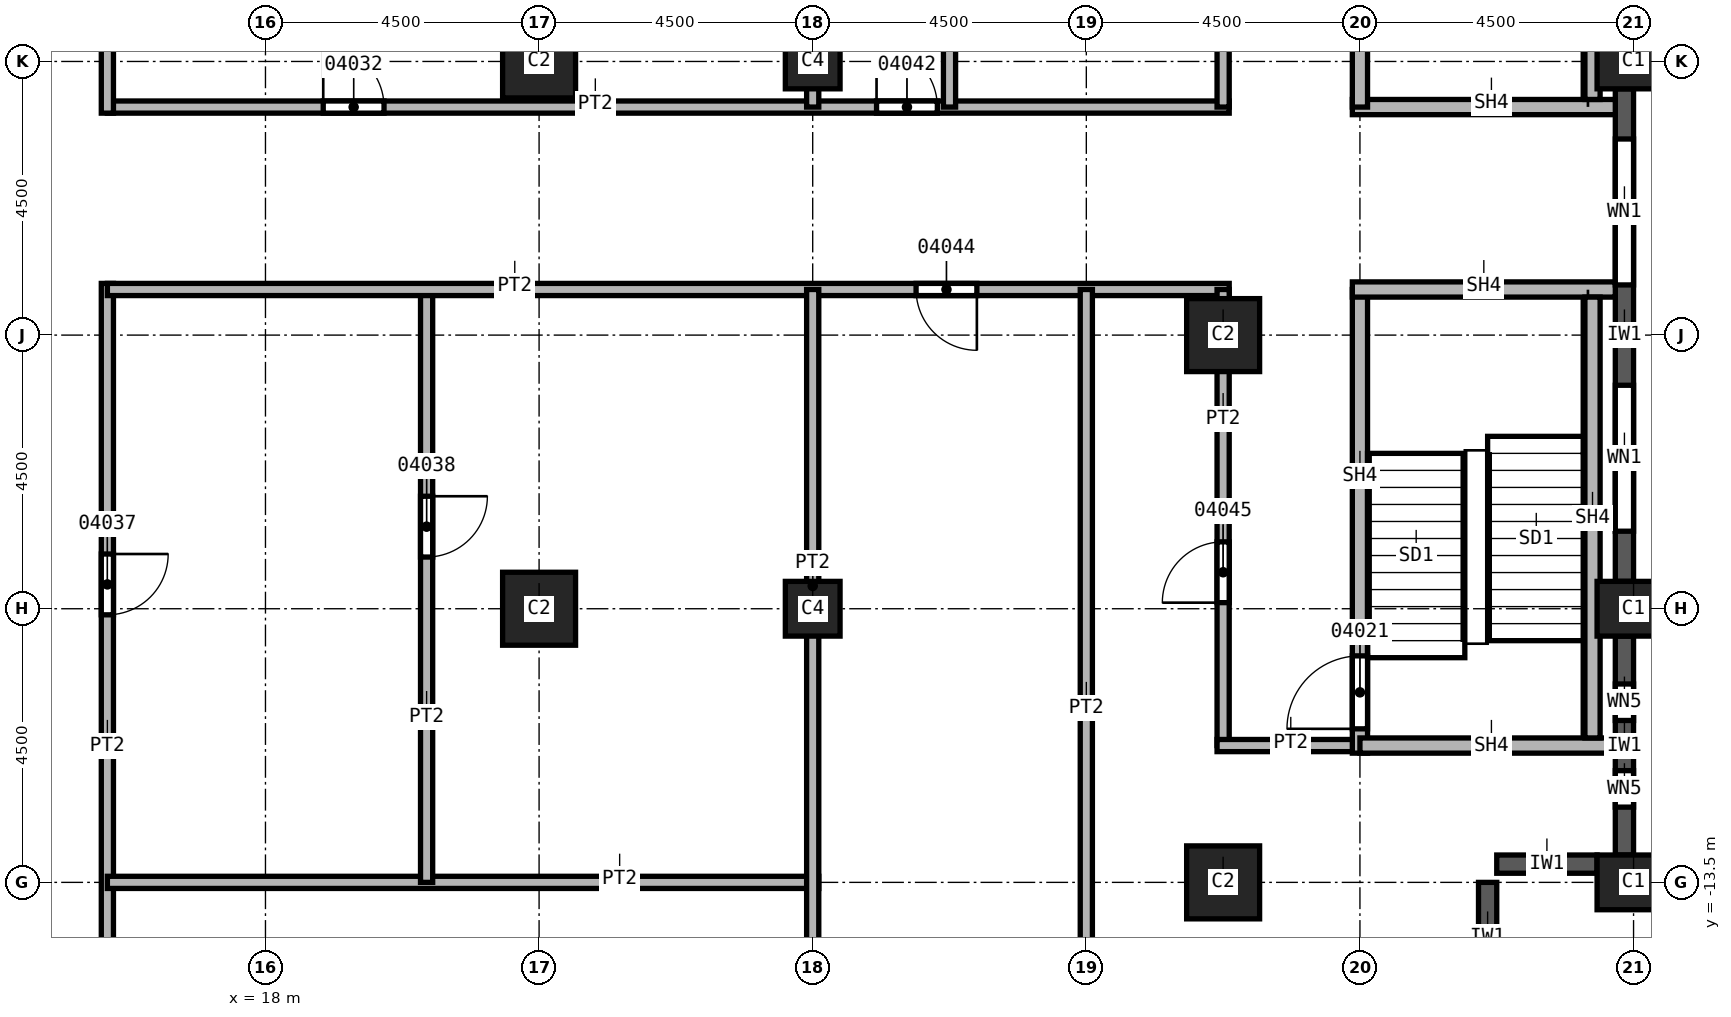
"""IFC4 building model, lengths in metres.
Left out: names, types, materials, properties, quantities, classifications, styles, units other than length and angle.
Written with IfcOpenShell. Run it as: python <this file> out.ifc"""

import sys

from ifc_helpers import new_model, si_unit, direction, frame, frame_2d, origin, origin_2d, place, context, subcontext, project, spatial, rectangle, extrude, element, fill, save


model = new_model("IFC4")
c1 = context("Model", 3, precision=1e-05, world=origin(), true_north=direction((0.0, 1.0)))
c2 = subcontext(c1, "Body", "Model", "MODEL_VIEW")
j1 = project(units=[si_unit("LENGTHUNIT", "METRE"), si_unit("PLANEANGLEUNIT", "RADIAN")], contexts=[c1])
p1 = place(None, origin())
s1 = spatial("IfcSite", under=j1, at=p1, CompositionType="ELEMENT")
p2 = place(p1, origin())
s2 = spatial("IfcBuilding", under=s1, at=p2, CompositionType="ELEMENT")
p3 = place(p2, frame((0.0, 0.0, 108.0)))
s3 = spatial("IfcBuildingStorey", under=s2, at=p3, CompositionType="ELEMENT", Elevation=108.0)
for number, where, z_axis, x_axis in (
    (1, (40.5, 0.0, 0.0), (0.0, 0.0, 1.0), (0.0, 1.0, 0.0)),
    (2, (40.5, -9.0, 0.0), (0.0, 0.0, 1.0), (0.0, 1.0, 0.0)),
    (3, (40.5, -13.5, 0.0), (0.0, 0.0, 1.0), (0.0, 1.0, 0.0)),
):
    element("IfcColumn", number, at=place(p3, frame(where, z_axis=z_axis, x_axis=x_axis)), inside=s3, PredefinedType="COLUMN", context=c2, shape_type="SweptSolid", body=[
        extrude(rectangle(XDim=0.9, YDim=1.2, at=origin_2d()), origin(), (0.0, 0.0, 1.0), 3.7),
    ])
for number, where, z_axis, x_axis in (
    (4, (33.75, -4.5, 0.0), (0.0, 0.0, 1.0), (1.0, 0.0, 0.0)),
    (5, (33.75, -13.5, 0.0), (0.0, 0.0, 1.0), (1.0, 0.0, 0.0)),
    (6, (22.5, 0.0, 0.0), (0.0, 0.0, 1.0), (1.0, 0.0, 0.0)),
    (7, (22.5, -9.0, 0.0), (0.0, 0.0, 1.0), (1.0, 0.0, 0.0)),
):
    element("IfcColumn", number, at=place(p3, frame(where, z_axis=z_axis, x_axis=x_axis)), inside=s3, PredefinedType="COLUMN", context=c2, shape_type="SweptSolid", body=[
        extrude(rectangle(XDim=1.2, YDim=1.2, at=origin_2d()), origin(), (0.0, 0.0, 1.0), 3.7),
    ])
for number, where, z_axis, x_axis in (
    (8, (27.0, 0.0, 0.0), (0.0, 0.0, 1.0), (1.0, 0.0, 0.0)),
    (9, (27.0, -9.0, 0.0), (0.0, 0.0, 1.0), (1.0, 0.0, 0.0)),
):
    element("IfcColumn", number, at=place(p3, frame(where, z_axis=z_axis, x_axis=x_axis)), inside=s3, PredefinedType="COLUMN", context=c2, shape_type="SweptSolid", body=[
        extrude(rectangle(XDim=0.9, YDim=0.9, at=origin_2d()), origin(), (0.0, 0.0, 1.0), 3.7),
    ])
p4 = place(p3, frame((38.1, -15.3, 0.0), z_axis=(0.0, 0.0, 1.0), x_axis=(0.0, 1.0, 0.0)))
e10 = element("IfcWall", 10, at=p4, inside=s3, PredefinedType="SOLIDWALL", context=c2, shape_type="SweptSolid", body=[
    extrude(rectangle(XDim=1.8, YDim=0.3, at=frame_2d((0.9, 0.0))), origin(), (0.0, 0.0, 1.0), 3.1),
])
p5 = place(p3, frame((39.9, -13.2, 0.0), z_axis=(0.0, 0.0, 1.0), x_axis=(-1.0, 0.0, 0.0)))
e11 = element("IfcWall", 11, at=p5, inside=s3, PredefinedType="SOLIDWALL", context=c2, shape_type="SweptSolid", body=[
    extrude(rectangle(XDim=1.65, YDim=0.3, at=frame_2d((0.825, 0.0))), origin(), (0.0, 0.0, 1.0), 3.1),
])
p6 = place(p3, frame((40.35, -13.05, 0.0), z_axis=(0.0, 0.0, 1.0), x_axis=(0.0, 1.0, 0.0)))
e12 = element("IfcWall", 12, at=p6, inside=s3, PredefinedType="SOLIDWALL", context=c2, shape_type="SweptSolid", body=[
    extrude(rectangle(XDim=3.6, YDim=0.3, at=frame_2d((1.8, 0.0))), origin(), (0.0, 0.0, 1.0), 3.1),
])
p7 = place(p6, frame((0.788, 0.0, 0.8)))
e13 = element("IfcOpeningElement", 13, at=p7, cuts=e12, PredefinedType="OPENING", context=c2, shape_type="SweptSolid", body=[
    extrude(rectangle(XDim=0.6, YDim=1.95, at=frame_2d((0.3, 0.975))), frame((0.0, 0.15, 0.0), z_axis=(0.0, -1.0, 0.0), x_axis=(1.0, 0.0, 0.0)), (0.0, 0.0, 1.0), 0.3),
])
p8 = place(p6, frame((2.212, 0.0, 0.8)))
e14 = element("IfcOpeningElement", 14, at=p8, cuts=e12, PredefinedType="OPENING", context=c2, shape_type="SweptSolid", body=[
    extrude(rectangle(XDim=0.6, YDim=1.95, at=frame_2d((0.3, 0.975))), frame((0.0, 0.15, 0.0), z_axis=(0.0, -1.0, 0.0), x_axis=(1.0, 0.0, 0.0)), (0.0, 0.0, 1.0), 0.3),
])
p9 = place(p3, frame((40.35, -8.55, 0.0), z_axis=(0.0, 0.0, 1.0), x_axis=(0.0, 1.0, 0.0)))
e15 = element("IfcWall", 15, at=p9, inside=s3, PredefinedType="SOLIDWALL", context=c2, shape_type="SweptSolid", body=[
    extrude(rectangle(XDim=8.1, YDim=0.3, at=frame_2d((4.05, 0.0))), origin(), (0.0, 0.0, 1.0), 3.1),
])
p10 = place(p9, frame((0.825, 0.0, 0.8)))
e16 = element("IfcOpeningElement", 16, at=p10, cuts=e15, PredefinedType="OPENING", context=c2, shape_type="SweptSolid", body=[
    extrude(rectangle(XDim=2.4, YDim=1.95, at=frame_2d((1.2, 0.975))), frame((0.0, 0.15, 0.0), z_axis=(0.0, -1.0, 0.0), x_axis=(1.0, 0.0, 0.0)), (0.0, 0.0, 1.0), 0.3),
])
p11 = place(p9, frame((4.875, 0.0, 0.8)))
e17 = element("IfcOpeningElement", 17, at=p11, cuts=e15, PredefinedType="OPENING", context=c2, shape_type="SweptSolid", body=[
    extrude(rectangle(XDim=2.4, YDim=1.95, at=frame_2d((1.2, 0.975))), frame((0.0, 0.15, 0.0), z_axis=(0.0, -1.0, 0.0), x_axis=(1.0, 0.0, 0.0)), (0.0, 0.0, 1.0), 0.3),
])
p12 = place(p3, frame((15.4, -3.65, 0.0), z_axis=(0.0, 0.0, 1.0), x_axis=(0.0, -1.0, 0.0)))
e18 = element("IfcWall", 18, at=p12, inside=s3, PredefinedType="PARTITIONING", context=c2, shape_type="SweptSolid", body=[
    extrude(rectangle(XDim=20.85, YDim=0.2, at=frame_2d((10.425, 0.0))), origin(), (0.0, 0.0, 1.0), 3.7),
])
p13 = place(p12, frame((18.85, 0.0, 0.0)))
e19 = element("IfcOpeningElement", 19, at=p13, cuts=e18, PredefinedType="OPENING", context=c2, shape_type="SweptSolid", body=[
    extrude(rectangle(XDim=1.0, YDim=2.1, at=frame_2d((0.5, 1.05))), frame((0.0, 0.1, 0.0), z_axis=(0.0, -1.0, 0.0), x_axis=(1.0, 0.0, 0.0)), (0.0, 0.0, 1.0), 0.2),
])
p14 = place(p12, frame((12.55, 0.0, 0.0)))
e20 = element("IfcOpeningElement", 20, at=p14, cuts=e18, PredefinedType="OPENING", context=c2, shape_type="SweptSolid", body=[
    extrude(rectangle(XDim=1.0, YDim=2.1, at=frame_2d((0.5, 1.05))), frame((0.0, 0.1, 0.0), z_axis=(0.0, -1.0, 0.0), x_axis=(1.0, 0.0, 0.0)), (0.0, 0.0, 1.0), 0.2),
])
p15 = place(p12, frame((4.45, 0.0, 0.0)))
e21 = element("IfcOpeningElement", 21, at=p15, cuts=e18, PredefinedType="OPENING", context=c2, shape_type="SweptSolid", body=[
    extrude(rectangle(XDim=1.0, YDim=2.1, at=frame_2d((0.5, 1.05))), frame((0.0, 0.1, 0.0), z_axis=(0.0, -1.0, 0.0), x_axis=(1.0, 0.0, 0.0)), (0.0, 0.0, 1.0), 0.2),
])
p16 = place(p3, frame((15.4, -13.5, 0.0), z_axis=(0.0, 0.0, 1.0), x_axis=(1.0, 0.0, 0.0)))
e22 = element("IfcWall", 22, at=p16, inside=s3, PredefinedType="PARTITIONING", context=c2, shape_type="SweptSolid", body=[
    extrude(rectangle(XDim=11.7, YDim=0.2, at=frame_2d((5.85, 0.0))), origin(), (0.0, 0.0, 1.0), 3.7),
])
p17 = place(p3, frame((15.4, -0.75, 0.0), z_axis=(0.0, 0.0, 1.0), x_axis=(1.0, 0.0, 0.0)))
e23 = element("IfcWall", 23, at=p17, inside=s3, PredefinedType="PARTITIONING", context=c2, shape_type="SweptSolid", body=[
    extrude(rectangle(XDim=18.45, YDim=0.2, at=frame_2d((9.225, 0.0))), origin(), (0.0, 0.0, 1.0), 3.7),
])
p18 = place(p17, frame((3.55, 0.0, 0.0)))
e24 = element("IfcOpeningElement", 24, at=p18, cuts=e23, PredefinedType="OPENING", context=c2, shape_type="SweptSolid", body=[
    extrude(rectangle(XDim=1.0, YDim=2.1, at=frame_2d((0.5, 1.05))), frame((0.0, 0.1, 0.0), z_axis=(0.0, -1.0, 0.0), x_axis=(1.0, 0.0, 0.0)), (0.0, 0.0, 1.0), 0.2),
])
p19 = place(p17, frame((12.65, 0.0, 0.0)))
e25 = element("IfcOpeningElement", 25, at=p19, cuts=e23, PredefinedType="OPENING", context=c2, shape_type="SweptSolid", body=[
    extrude(rectangle(XDim=1.0, YDim=2.1, at=frame_2d((0.5, 1.05))), frame((0.0, 0.1, 0.0), z_axis=(0.0, -1.0, 0.0), x_axis=(1.0, 0.0, 0.0)), (0.0, 0.0, 1.0), 0.2),
])
p20 = place(p3, frame((15.4, 24.5, 0.0), z_axis=(0.0, 0.0, 1.0), x_axis=(0.0, -1.0, 0.0)))
e26 = element("IfcWall", 26, at=p20, inside=s3, PredefinedType="PARTITIONING", context=c2, shape_type="SweptSolid", body=[
    extrude(rectangle(XDim=25.35, YDim=0.2, at=frame_2d((12.675, 0.0))), origin(), (0.0, 0.0, 1.0), 3.7),
])
p21 = place(p20, frame((4.6, 0.0, 0.0)))
e27 = element("IfcOpeningElement", 27, at=p21, cuts=e26, PredefinedType="OPENING", context=c2, shape_type="SweptSolid", body=[
    extrude(rectangle(XDim=1.0, YDim=2.1, at=frame_2d((0.5, 1.05))), frame((0.0, 0.1, 0.0), z_axis=(0.0, -1.0, 0.0), x_axis=(1.0, 0.0, 0.0)), (0.0, 0.0, 1.0), 0.2),
])
p22 = place(p3, frame((20.65, -3.75, 0.0), z_axis=(0.0, 0.0, 1.0), x_axis=(0.0, -1.0, 0.0)))
e28 = element("IfcWall", 28, at=p22, inside=s3, PredefinedType="PARTITIONING", context=c2, shape_type="SweptSolid", body=[
    extrude(rectangle(XDim=9.75, YDim=0.2, at=frame_2d((4.875, 0.0))), origin(), (0.0, 0.0, 1.0), 3.7),
])
p23 = place(p22, frame((3.4, 0.0, 0.0)))
e29 = element("IfcOpeningElement", 29, at=p23, cuts=e28, PredefinedType="OPENING", context=c2, shape_type="SweptSolid", body=[
    extrude(rectangle(XDim=1.0, YDim=2.1, at=frame_2d((0.5, 1.05))), frame((0.0, 0.1, 0.0), z_axis=(0.0, -1.0, 0.0), x_axis=(1.0, 0.0, 0.0)), (0.0, 0.0, 1.0), 0.2),
])
p24 = place(p3, frame((33.85, -3.75, 0.0), z_axis=(0.0, 0.0, 1.0), x_axis=(-1.0, 0.0, 0.0)))
e30 = element("IfcWall", 30, at=p24, inside=s3, PredefinedType="PARTITIONING", context=c2, shape_type="SweptSolid", body=[
    extrude(rectangle(XDim=18.45, YDim=0.2, at=frame_2d((9.225, 0.0))), origin(), (0.0, 0.0, 1.0), 3.7),
])
p25 = place(p24, frame((4.15, 0.0, 0.0)))
e31 = element("IfcOpeningElement", 31, at=p25, cuts=e30, PredefinedType="OPENING", context=c2, shape_type="SweptSolid", body=[
    extrude(rectangle(XDim=1.0, YDim=2.1, at=frame_2d((0.5, 1.05))), frame((0.0, 0.1, 0.0), z_axis=(0.0, -1.0, 0.0), x_axis=(1.0, 0.0, 0.0)), (0.0, 0.0, 1.0), 0.2),
])
p26 = place(p3, frame((27.0, -3.75, 0.0), z_axis=(0.0, 0.0, 1.0), x_axis=(0.0, -1.0, 0.0)))
e32 = element("IfcWall", 32, at=p26, inside=s3, PredefinedType="PARTITIONING", context=c2, shape_type="SweptSolid", body=[
    extrude(rectangle(XDim=13.65, YDim=0.2, at=frame_2d((6.825, 0.0))), origin(), (0.0, 0.0, 1.0), 3.7),
])
p27 = place(p3, frame((27.0, 17.4, 0.0), z_axis=(0.0, 0.0, 1.0), x_axis=(0.0, -1.0, 0.0)))
e33 = element("IfcWall", 33, at=p27, inside=s3, PredefinedType="PARTITIONING", context=c2, shape_type="SweptSolid", body=[
    extrude(rectangle(XDim=18.15, YDim=0.2, at=frame_2d((9.075, 0.0))), origin(), (0.0, 0.0, 1.0), 3.7),
])
p28 = place(p3, frame((29.25, 17.7, 0.0), z_axis=(0.0, 0.0, 1.0), x_axis=(0.0, -1.0, 0.0)))
e34 = element("IfcWall", 34, at=p28, inside=s3, PredefinedType="PARTITIONING", context=c2, shape_type="SweptSolid", body=[
    extrude(rectangle(XDim=18.45, YDim=0.2, at=frame_2d((9.225, 0.0))), origin(), (0.0, 0.0, 1.0), 3.7),
])
p29 = place(p3, frame((31.5, -3.75, 0.0), z_axis=(0.0, 0.0, 1.0), x_axis=(0.0, -1.0, 0.0)))
e35 = element("IfcWall", 35, at=p29, inside=s3, PredefinedType="PARTITIONING", context=c2, shape_type="SweptSolid", body=[
    extrude(rectangle(XDim=13.65, YDim=0.2, at=frame_2d((6.825, 0.0))), origin(), (0.0, 0.0, 1.0), 3.7),
])
p30 = place(p3, frame((33.75, -11.25, 0.0), z_axis=(0.0, 0.0, 1.0), x_axis=(0.0, 1.0, 0.0)))
e36 = element("IfcWall", 36, at=p30, inside=s3, PredefinedType="PARTITIONING", context=c2, shape_type="SweptSolid", body=[
    extrude(rectangle(XDim=7.5, YDim=0.2, at=frame_2d((3.75, 0.0))), origin(), (0.0, 0.0, 1.0), 3.7),
])
p31 = place(p30, frame((2.35, 0.0, 0.0)))
e37 = element("IfcOpeningElement", 37, at=p31, cuts=e36, PredefinedType="OPENING", context=c2, shape_type="SweptSolid", body=[
    extrude(rectangle(XDim=1.0, YDim=2.1, at=frame_2d((0.5, 1.05))), frame((0.0, 0.1, 0.0), z_axis=(0.0, -1.0, 0.0), x_axis=(1.0, 0.0, 0.0)), (0.0, 0.0, 1.0), 0.2),
])
p32 = place(p3, frame((33.75, -0.75, 0.0), z_axis=(0.0, 0.0, 1.0), x_axis=(0.0, 1.0, 0.0)))
e38 = element("IfcWall", 38, at=p32, inside=s3, PredefinedType="PARTITIONING", context=c2, shape_type="SweptSolid", body=[
    extrude(rectangle(XDim=7.5, YDim=0.2, at=frame_2d((3.75, 0.0))), origin(), (0.0, 0.0, 1.0), 3.7),
])
p33 = place(p32, frame((3.4, 0.0, 0.0)))
e39 = element("IfcOpeningElement", 39, at=p33, cuts=e38, PredefinedType="OPENING", context=c2, shape_type="SweptSolid", body=[
    extrude(rectangle(XDim=1.0, YDim=2.1, at=frame_2d((0.5, 1.05))), frame((0.0, 0.1, 0.0), z_axis=(0.0, -1.0, 0.0), x_axis=(1.0, 0.0, 0.0)), (0.0, 0.0, 1.0), 0.2),
])
p34 = place(p3, frame((36.0, -11.25, 0.0), z_axis=(0.0, 0.0, 1.0), x_axis=(-1.0, 0.0, 0.0)))
e40 = element("IfcWall", 40, at=p34, inside=s3, PredefinedType="PARTITIONING", context=c2, shape_type="SweptSolid", body=[
    extrude(rectangle(XDim=2.35, YDim=0.2, at=frame_2d((1.175, 0.0))), origin(), (0.0, 0.0, 1.0), 3.7),
])
p35 = place(p3, frame((35.875, -0.75, 0.0), z_axis=(0.0, 0.0, 1.0), x_axis=(1.0, 0.0, 0.0)))
e41 = element("IfcWall", 41, at=p35, inside=s3, PredefinedType="SOLIDWALL", context=c2, shape_type="SweptSolid", body=[
    extrude(rectangle(XDim=4.325, YDim=0.25, at=frame_2d((2.163, 0.0))), origin(), (0.0, 0.0, 1.0), 3.7),
])
p36 = place(p3, frame((36.0, -11.375, 0.0), z_axis=(0.0, 0.0, 1.0), x_axis=(0.0, 1.0, 0.0)))
e42 = element("IfcWall", 42, at=p36, inside=s3, PredefinedType="SOLIDWALL", context=c2, shape_type="SweptSolid", body=[
    extrude(rectangle(XDim=7.625, YDim=0.25, at=frame_2d((3.812, 0.0))), origin(), (0.0, 0.0, 1.0), 3.7),
])
p37 = place(p36, frame((0.4, 0.0, 0.0)))
e43 = element("IfcOpeningElement", 43, at=p37, cuts=e42, PredefinedType="OPENING", context=c2, shape_type="SweptSolid", body=[
    extrude(rectangle(XDim=1.2, YDim=2.1, at=frame_2d((0.6, 1.05))), frame((0.0, 0.125, 0.0), z_axis=(0.0, -1.0, 0.0), x_axis=(1.0, 0.0, 0.0)), (0.0, 0.0, 1.0), 0.25),
])
p38 = place(p3, frame((36.0, -0.75, 0.0), z_axis=(0.0, 0.0, 1.0), x_axis=(0.0, 1.0, 0.0)))
e44 = element("IfcWall", 44, at=p38, inside=s3, PredefinedType="SOLIDWALL", context=c2, shape_type="SweptSolid", body=[
    extrude(rectangle(XDim=7.625, YDim=0.25, at=frame_2d((3.812, 0.0))), origin(), (0.0, 0.0, 1.0), 3.7),
])
p39 = place(p38, frame((5.95, 0.0, 0.0)))
e45 = element("IfcOpeningElement", 45, at=p39, cuts=e44, PredefinedType="OPENING", context=c2, shape_type="SweptSolid", body=[
    extrude(rectangle(XDim=1.2, YDim=2.1, at=frame_2d((0.6, 1.05))), frame((0.0, 0.125, 0.0), z_axis=(0.0, -1.0, 0.0), x_axis=(1.0, 0.0, 0.0)), (0.0, 0.0, 1.0), 0.25),
])
p40 = place(p3, frame((40.2, -11.25, 0.0), z_axis=(0.0, 0.0, 1.0), x_axis=(-1.0, 0.0, 0.0)))
e46 = element("IfcWall", 46, at=p40, inside=s3, PredefinedType="SOLIDWALL", context=c2, shape_type="SweptSolid", body=[
    extrude(rectangle(XDim=4.2, YDim=0.25, at=frame_2d((2.1, 0.0))), origin(), (0.0, 0.0, 1.0), 3.7),
])
p41 = place(p3, frame((40.2, -3.75, 0.0), z_axis=(0.0, 0.0, 1.0), x_axis=(-1.0, 0.0, 0.0)))
e47 = element("IfcWall", 47, at=p41, inside=s3, PredefinedType="SOLIDWALL", context=c2, shape_type="SweptSolid", body=[
    extrude(rectangle(XDim=4.325, YDim=0.25, at=frame_2d((2.163, 0.0))), origin(), (0.0, 0.0, 1.0), 3.7),
])
for number, where, z_axis, x_axis in (
    (48, (39.825, -11.125, 0.0), (0.0, 0.0, 1.0), (0.0, 1.0, 0.0)),
    (49, (39.825, -0.625, 0.0), (0.0, 0.0, 1.0), (0.0, 1.0, 0.0)),
):
    element("IfcWall", number, at=place(p3, frame(where, z_axis=z_axis, x_axis=x_axis)), inside=s3, PredefinedType="SOLIDWALL", context=c2, shape_type="SweptSolid", body=[
        extrude(rectangle(XDim=7.25, YDim=0.25, at=frame_2d((3.625, 0.0))), origin(), (0.0, 0.0, 1.0), 3.7),
    ])
p42 = place(p10, origin())
e50 = element("IfcWindow", 50, at=p42, inside=s3, PartitioningType="SINGLE_PANEL", PredefinedType="WINDOW", context=c2, shape_type="SweptSolid", body=[
    extrude(rectangle(XDim=2.4, YDim=1.95, at=frame_2d((1.2, 0.975))), frame((0.0, 0.03, 0.0), z_axis=(0.0, -1.0, 0.0), x_axis=(1.0, 0.0, 0.0)), (0.0, 0.0, 1.0), 0.06),
])
fill(e16, e50)
p43 = place(p11, origin())
e51 = element("IfcWindow", 51, at=p43, inside=s3, PartitioningType="SINGLE_PANEL", PredefinedType="WINDOW", context=c2, shape_type="SweptSolid", body=[
    extrude(rectangle(XDim=2.4, YDim=1.95, at=frame_2d((1.2, 0.975))), frame((0.0, 0.03, 0.0), z_axis=(0.0, -1.0, 0.0), x_axis=(1.0, 0.0, 0.0)), (0.0, 0.0, 1.0), 0.06),
])
fill(e17, e51)
p44 = place(p37, origin())
e52 = element("IfcDoor", 52, at=p44, inside=s3, OperationType="SINGLE_SWING_RIGHT", PredefinedType="DOOR", context=c2, shape_type="SweptSolid", body=[
    extrude(rectangle(XDim=1.2, YDim=2.1, at=frame_2d((0.6, 1.05))), frame((0.0, 0.025, 0.0), z_axis=(0.0, -1.0, 0.0), x_axis=(1.0, 0.0, 0.0)), (0.0, 0.0, 1.0), 0.05),
])
fill(e43, e52)
p45 = place(p18, origin())
e53 = element("IfcDoor", 53, at=p45, inside=s3, OperationType="SINGLE_SWING_LEFT", PredefinedType="DOOR", context=c2, shape_type="SweptSolid", body=[
    extrude(rectangle(XDim=1.0, YDim=2.1, at=frame_2d((0.5, 1.05))), frame((0.0, 0.025, 0.0), z_axis=(0.0, -1.0, 0.0), x_axis=(1.0, 0.0, 0.0)), (0.0, 0.0, 1.0), 0.05),
])
fill(e24, e53)
p46 = place(p15, origin())
e54 = element("IfcDoor", 54, at=p46, inside=s3, OperationType="SINGLE_SWING_RIGHT", PredefinedType="DOOR", context=c2, shape_type="SweptSolid", body=[
    extrude(rectangle(XDim=1.0, YDim=2.1, at=frame_2d((0.5, 1.05))), frame((0.0, 0.025, 0.0), z_axis=(0.0, -1.0, 0.0), x_axis=(1.0, 0.0, 0.0)), (0.0, 0.0, 1.0), 0.05),
])
fill(e21, e54)
p47 = place(p23, origin())
e55 = element("IfcDoor", 55, at=p47, inside=s3, OperationType="SINGLE_SWING_LEFT", PredefinedType="DOOR", context=c2, shape_type="SweptSolid", body=[
    extrude(rectangle(XDim=1.0, YDim=2.1, at=frame_2d((0.5, 1.05))), frame((0.0, 0.025, 0.0), z_axis=(0.0, -1.0, 0.0), x_axis=(1.0, 0.0, 0.0)), (0.0, 0.0, 1.0), 0.05),
])
fill(e29, e55)
p48 = place(p19, origin())
e56 = element("IfcDoor", 56, at=p48, inside=s3, OperationType="SINGLE_SWING_LEFT", PredefinedType="DOOR", context=c2, shape_type="SweptSolid", body=[
    extrude(rectangle(XDim=1.0, YDim=2.1, at=frame_2d((0.5, 1.05))), frame((0.0, 0.025, 0.0), z_axis=(0.0, -1.0, 0.0), x_axis=(1.0, 0.0, 0.0)), (0.0, 0.0, 1.0), 0.05),
])
fill(e25, e56)
p49 = place(p25, origin())
e57 = element("IfcDoor", 57, at=p49, inside=s3, OperationType="SINGLE_SWING_LEFT", PredefinedType="DOOR", context=c2, shape_type="SweptSolid", body=[
    extrude(rectangle(XDim=1.0, YDim=2.1, at=frame_2d((0.5, 1.05))), frame((0.0, 0.025, 0.0), z_axis=(0.0, -1.0, 0.0), x_axis=(1.0, 0.0, 0.0)), (0.0, 0.0, 1.0), 0.05),
])
fill(e31, e57)
p50 = place(p31, origin())
e58 = element("IfcDoor", 58, at=p50, inside=s3, OperationType="SINGLE_SWING_RIGHT", PredefinedType="DOOR", context=c2, shape_type="SweptSolid", body=[
    extrude(rectangle(XDim=1.0, YDim=2.1, at=frame_2d((0.5, 1.05))), frame((0.0, 0.025, 0.0), z_axis=(0.0, -1.0, 0.0), x_axis=(1.0, 0.0, 0.0)), (0.0, 0.0, 1.0), 0.05),
])
fill(e37, e58)
p51 = place(p7, origin())
e59 = element("IfcWindow", 59, at=p51, inside=s3, PartitioningType="SINGLE_PANEL", PredefinedType="WINDOW", context=c2, shape_type="SweptSolid", body=[
    extrude(rectangle(XDim=0.6, YDim=1.95, at=frame_2d((0.3, 0.975))), frame((0.0, 0.03, 0.0), z_axis=(0.0, -1.0, 0.0), x_axis=(1.0, 0.0, 0.0)), (0.0, 0.0, 1.0), 0.06),
])
fill(e13, e59)
p52 = place(p8, origin())
e60 = element("IfcWindow", 60, at=p52, inside=s3, PartitioningType="SINGLE_PANEL", PredefinedType="WINDOW", context=c2, shape_type="SweptSolid", body=[
    extrude(rectangle(XDim=0.6, YDim=1.95, at=frame_2d((0.3, 0.975))), frame((0.0, 0.03, 0.0), z_axis=(0.0, -1.0, 0.0), x_axis=(1.0, 0.0, 0.0)), (0.0, 0.0, 1.0), 0.06),
])
fill(e14, e60)
save(model, sys.argv[1])
